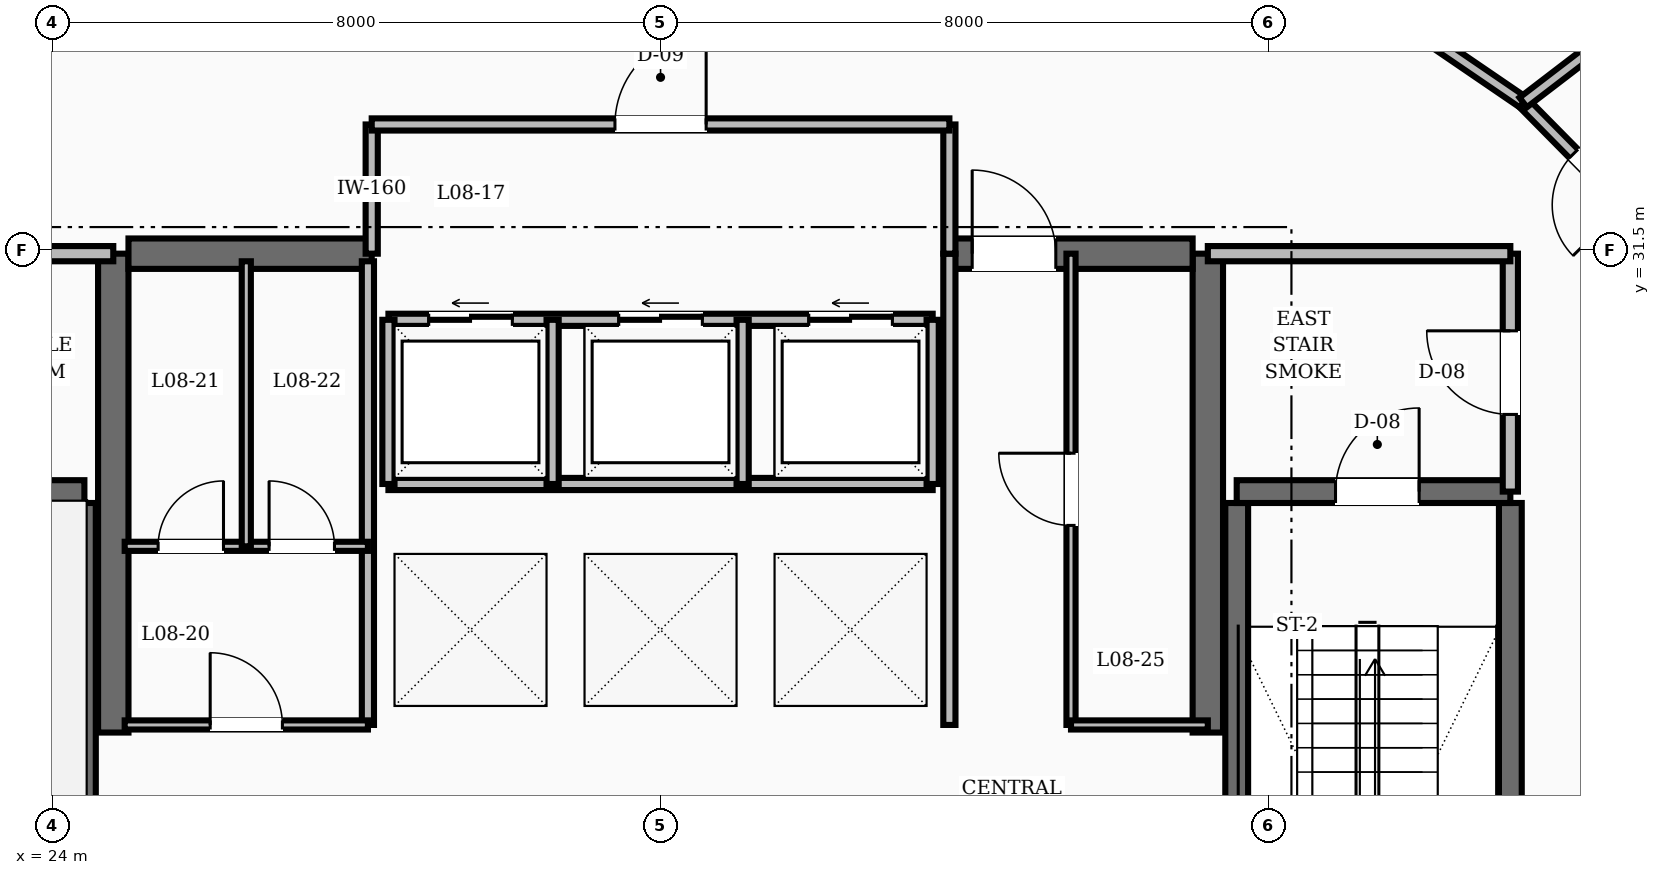
"""IFC4 building model, lengths in metres.
Left out: names, types, materials, properties, quantities, classifications, styles, units other than length and angle.
Written with IfcOpenShell. Run it as: python <this file> out.ifc"""

import sys

from ifc_helpers import new_model, si_unit, direction, frame, frame_2d, origin, place, context, subcontext, project, spatial, rectangle, extrude, element, fill, save


model = new_model("IFC4")
c1 = context("Model", 3, precision=1e-05, world=origin(), true_north=direction((0.0, 1.0)))
c2 = subcontext(c1, "Body", "Model", "MODEL_VIEW")
j1 = project(units=[si_unit("LENGTHUNIT", "METRE"), si_unit("PLANEANGLEUNIT", "RADIAN")], contexts=[c1])
p1 = place(None, origin())
s1 = spatial("IfcSite", under=j1, at=p1, CompositionType="ELEMENT")
p2 = place(p1, origin())
s2 = spatial("IfcBuilding", under=s1, at=p2, CompositionType="ELEMENT")
p3 = place(p2, frame((0.0, 0.0, 37.6)))
s3 = spatial("IfcBuildingStorey", under=s2, at=p3, CompositionType="ELEMENT", Elevation=37.6)
for number, where, z_axis, x_axis in (
    (1, (24.8, 25.15, 0.0), (0.0, 0.0, 1.0), (0.0, 1.0, 0.0)),
    (2, (39.2, 25.15, 0.0), (0.0, 0.0, 1.0), (0.0, 1.0, 0.0)),
):
    element("IfcWall", number, at=place(p3, frame(where, z_axis=z_axis, x_axis=x_axis)), inside=s3, PredefinedType="SHEAR", context=c2, shape_type="SweptSolid", body=[
        extrude(rectangle(XDim=6.3, YDim=0.4, at=frame_2d((3.15, 0.0))), origin(), (0.0, 0.0, 1.0), 3.6),
    ])
p4 = place(p3, frame((25.0, 31.45, 0.0), z_axis=(0.0, 0.0, 1.0), x_axis=(1.0, 0.0, 0.0)))
e3 = element("IfcWall", 3, at=p4, inside=s3, PredefinedType="SHEAR", context=c2, shape_type="SweptSolid", body=[
    extrude(rectangle(XDim=3.2, YDim=0.4, at=frame_2d((1.6, 0.0))), origin(), (0.0, 0.0, 1.0), 3.6),
])
p5 = place(p3, frame((35.8, 31.45, 0.0), z_axis=(0.0, 0.0, 1.0), x_axis=(1.0, 0.0, 0.0)))
e4 = element("IfcWall", 4, at=p5, inside=s3, PredefinedType="SHEAR", context=c2, shape_type="SweptSolid", body=[
    extrude(rectangle(XDim=3.2, YDim=0.4, at=frame_2d((1.6, 0.0))), origin(), (0.0, 0.0, 1.0), 3.6),
])
p6 = place(p5, frame((0.3, 0.0, 0.0)))
e5 = element("IfcOpeningElement", 5, at=p6, cuts=e4, PredefinedType="OPENING", context=c2, shape_type="SweptSolid", body=[
    extrude(rectangle(XDim=1.1, YDim=2.1, at=frame_2d((0.55, 1.05))), frame((0.0, 0.21, 0.0), z_axis=(0.0, -1.0, 0.0), x_axis=(1.0, 0.0, 0.0)), (0.0, 0.0, 1.0), 0.42),
])
p7 = place(p3, frame((24.42, 19.43, 0.0), z_axis=(0.0, 0.0, 1.0), x_axis=(0.0, 1.0, 0.0)))
e6 = element("IfcWall", 6, at=p7, inside=s3, PredefinedType="SHEAR", context=c2, shape_type="SweptSolid", body=[
    extrude(rectangle(XDim=8.74, YDim=0.3, at=frame_2d((4.37, 0.0))), origin(), (0.0, 0.0, 1.0), 3.6),
])
p8 = place(p3, frame((20.82, 28.32, 0.0), z_axis=(0.0, 0.0, 1.0), x_axis=(1.0, 0.0, 0.0)))
e7 = element("IfcWall", 7, at=p8, inside=s3, PredefinedType="SHEAR", context=c2, shape_type="SweptSolid", body=[
    extrude(rectangle(XDim=3.6, YDim=0.3, at=frame_2d((1.8, 0.0))), origin(), (0.0, 0.0, 1.0), 3.6),
])
for number, where, z_axis, x_axis in (
    (8, (43.18, 19.43, 0.0), (0.0, 0.0, 1.0), (0.0, 1.0, 0.0)),
    (9, (39.58, 19.43, 0.0), (0.0, 0.0, 1.0), (0.0, 1.0, 0.0)),
):
    element("IfcWall", number, at=place(p3, frame(where, z_axis=z_axis, x_axis=x_axis)), inside=s3, PredefinedType="SHEAR", context=c2, shape_type="SweptSolid", body=[
        extrude(rectangle(XDim=8.74, YDim=0.3, at=frame_2d((4.37, 0.0))), origin(), (0.0, 0.0, 1.0), 3.6),
    ])
p9 = place(p3, frame((39.58, 28.32, 0.0), z_axis=(0.0, 0.0, 1.0), x_axis=(1.0, 0.0, 0.0)))
e10 = element("IfcWall", 10, at=p9, inside=s3, PredefinedType="SHEAR", context=c2, shape_type="SweptSolid", body=[
    extrude(rectangle(XDim=3.6, YDim=0.3, at=frame_2d((1.8, 0.0))), origin(), (0.0, 0.0, 1.0), 3.6),
])
p10 = place(p9, frame((1.3, 0.0, 0.0)))
e11 = element("IfcOpeningElement", 11, at=p10, cuts=e10, PredefinedType="OPENING", context=c2, shape_type="SweptSolid", body=[
    extrude(rectangle(XDim=1.1, YDim=2.1, at=frame_2d((0.55, 1.05))), frame((0.0, 0.16, 0.0), z_axis=(0.0, -1.0, 0.0), x_axis=(1.0, 0.0, 0.0)), (0.0, 0.0, 1.0), 0.32),
])
p11 = place(p3, frame((43.18, 28.32, 0.0), z_axis=(0.0, 0.0, 1.0), x_axis=(0.0, 1.0, 0.0)))
e12 = element("IfcWall", 12, at=p11, inside=s3, PredefinedType="SOLIDWALL", context=c2, shape_type="SweptSolid", body=[
    extrude(rectangle(XDim=3.13, YDim=0.2, at=frame_2d((1.565, 0.0))), origin(), (0.0, 0.0, 1.0), 2.61),
])
p12 = place(p11, frame((1.015, 0.0, 0.0)))
e13 = element("IfcOpeningElement", 13, at=p12, cuts=e12, PredefinedType="OPENING", context=c2, shape_type="SweptSolid", body=[
    extrude(rectangle(XDim=1.1, YDim=2.1, at=frame_2d((0.55, 1.05))), frame((0.0, 0.11, 0.0), z_axis=(0.0, -1.0, 0.0), x_axis=(1.0, 0.0, 0.0)), (0.0, 0.0, 1.0), 0.22),
])
for number, where, z_axis, x_axis in (
    (14, (39.2, 31.45, 0.0), (0.0, 0.0, 1.0), (1.0, 0.0, 0.0)),
    (15, (20.82, 31.45, 0.0), (0.0, 0.0, 1.0), (1.0, 0.0, 0.0)),
):
    element("IfcWall", number, at=place(p3, frame(where, z_axis=z_axis, x_axis=x_axis)), inside=s3, PredefinedType="SOLIDWALL", context=c2, shape_type="SweptSolid", body=[
        extrude(rectangle(XDim=3.98, YDim=0.2, at=frame_2d((1.99, 0.0))), origin(), (0.0, 0.0, 1.0), 2.61),
    ])
p13 = place(p3, frame((35.8, 25.25, 0.0), z_axis=(0.0, 0.0, 1.0), x_axis=(0.0, 1.0, 0.0)))
e16 = element("IfcWall", 16, at=p13, inside=s3, PredefinedType="SOLIDWALL", context=c2, shape_type="SweptSolid", body=[
    extrude(rectangle(XDim=6.2, YDim=0.16, at=frame_2d((3.1, 0.0))), origin(), (0.0, 0.0, 1.0), 2.61),
])
p14 = place(p3, frame((28.42, 30.58, 0.0), z_axis=(0.0, 0.0, 1.0), x_axis=(1.0, 0.0, 0.0)))
e17 = element("IfcWall", 17, at=p14, inside=s3, PredefinedType="SOLIDWALL", context=c2, shape_type="SweptSolid", body=[
    extrude(rectangle(XDim=7.16, YDim=0.16, at=frame_2d((3.58, 0.0))), origin(), (0.0, 0.0, 1.0), 2.61),
])
p15 = place(p14, frame((0.53, 0.0, 0.0)))
e18 = element("IfcOpeningElement", 18, at=p15, cuts=e17, PredefinedType="OPENING", context=c2, shape_type="SweptSolid", body=[
    extrude(rectangle(XDim=1.1, YDim=2.15, at=frame_2d((0.55, 1.075))), frame((0.0, 0.09, 0.0), z_axis=(0.0, -1.0, 0.0), x_axis=(1.0, 0.0, 0.0)), (0.0, 0.0, 1.0), 0.18),
])
p16 = place(p14, frame((3.03, 0.0, 0.0)))
e19 = element("IfcOpeningElement", 19, at=p16, cuts=e17, PredefinedType="OPENING", context=c2, shape_type="SweptSolid", body=[
    extrude(rectangle(XDim=1.1, YDim=2.15, at=frame_2d((0.55, 1.075))), frame((0.0, 0.09, 0.0), z_axis=(0.0, -1.0, 0.0), x_axis=(1.0, 0.0, 0.0)), (0.0, 0.0, 1.0), 0.18),
])
p17 = place(p14, frame((5.53, 0.0, 0.0)))
e20 = element("IfcOpeningElement", 20, at=p17, cuts=e17, PredefinedType="OPENING", context=c2, shape_type="SweptSolid", body=[
    extrude(rectangle(XDim=1.1, YDim=2.15, at=frame_2d((0.55, 1.075))), frame((0.0, 0.09, 0.0), z_axis=(0.0, -1.0, 0.0), x_axis=(1.0, 0.0, 0.0)), (0.0, 0.0, 1.0), 0.18),
])
p18 = place(p3, frame((28.42, 28.42, 0.0), z_axis=(0.0, 0.0, 1.0), x_axis=(1.0, 0.0, 0.0)))
e21 = element("IfcWall", 21, at=p18, inside=s3, PredefinedType="SOLIDWALL", context=c2, shape_type="SweptSolid", body=[
    extrude(rectangle(XDim=7.16, YDim=0.16, at=frame_2d((3.58, 0.0))), origin(), (0.0, 0.0, 1.0), 2.61),
])
for number, where, z_axis, x_axis in (
    (22, (28.42, 28.42, 0.0), (0.0, 0.0, 1.0), (0.0, 1.0, 0.0)),
    (23, (30.58, 28.42, 0.0), (0.0, 0.0, 1.0), (0.0, 1.0, 0.0)),
    (24, (33.08, 28.42, 0.0), (0.0, 0.0, 1.0), (0.0, 1.0, 0.0)),
    (25, (35.58, 28.42, 0.0), (0.0, 0.0, 1.0), (0.0, 1.0, 0.0)),
):
    element("IfcWall", number, at=place(p3, frame(where, z_axis=z_axis, x_axis=x_axis)), inside=s3, PredefinedType="SOLIDWALL", context=c2, shape_type="SweptSolid", body=[
        extrude(rectangle(XDim=2.16, YDim=0.16, at=frame_2d((1.08, 0.0))), origin(), (0.0, 0.0, 1.0), 2.61),
    ])
for number, where, z_axis, x_axis in (
    (26, (28.2, 31.45, 0.0), (0.0, 0.0, 1.0), (0.0, 1.0, 0.0)),
    (27, (35.8, 31.45, 0.0), (0.0, 0.0, 1.0), (0.0, 1.0, 0.0)),
):
    element("IfcWall", number, at=place(p3, frame(where, z_axis=z_axis, x_axis=x_axis)), inside=s3, PredefinedType="SOLIDWALL", context=c2, shape_type="SweptSolid", body=[
        extrude(rectangle(XDim=1.7, YDim=0.16, at=frame_2d((0.85, 0.0))), origin(), (0.0, 0.0, 1.0), 2.61),
    ])
p19 = place(p3, frame((28.2, 33.15, 0.0), z_axis=(0.0, 0.0, 1.0), x_axis=(1.0, 0.0, 0.0)))
e28 = element("IfcWall", 28, at=p19, inside=s3, PredefinedType="SOLIDWALL", context=c2, shape_type="SweptSolid", body=[
    extrude(rectangle(XDim=7.6, YDim=0.16, at=frame_2d((3.8, 0.0))), origin(), (0.0, 0.0, 1.0), 2.61),
])
p20 = place(p19, frame((3.2, 0.0, 0.0)))
e29 = element("IfcOpeningElement", 29, at=p20, cuts=e28, PredefinedType="OPENING", context=c2, shape_type="SweptSolid", body=[
    extrude(rectangle(XDim=1.2, YDim=2.1, at=frame_2d((0.6, 1.05))), frame((0.0, 0.09, 0.0), z_axis=(0.0, -1.0, 0.0), x_axis=(1.0, 0.0, 0.0)), (0.0, 0.0, 1.0), 0.18),
])
p21 = place(p3, frame((28.15, 25.25, 0.0), z_axis=(0.0, 0.0, 1.0), x_axis=(0.0, 1.0, 0.0)))
e30 = element("IfcWall", 30, at=p21, inside=s3, PredefinedType="SOLIDWALL", context=c2, shape_type="SweptSolid", body=[
    extrude(rectangle(XDim=6.1, YDim=0.16, at=frame_2d((3.05, 0.0))), origin(), (0.0, 0.0, 1.0), 2.61),
])
p22 = place(p3, frame((24.95, 25.25, 0.0), z_axis=(0.0, 0.0, 1.0), x_axis=(1.0, 0.0, 0.0)))
e31 = element("IfcWall", 31, at=p22, inside=s3, PredefinedType="PARTITIONING", context=c2, shape_type="SweptSolid", body=[
    extrude(rectangle(XDim=3.2, YDim=0.12, at=frame_2d((1.6, 0.0))), origin(), (0.0, 0.0, 1.0), 2.61),
])
p23 = place(p22, frame((1.125, 0.0, 0.0)))
e32 = element("IfcOpeningElement", 32, at=p23, cuts=e31, PredefinedType="OPENING", context=c2, shape_type="SweptSolid", body=[
    extrude(rectangle(XDim=0.95, YDim=2.1, at=frame_2d((0.475, 1.05))), frame((0.0, 0.07, 0.0), z_axis=(0.0, -1.0, 0.0), x_axis=(1.0, 0.0, 0.0)), (0.0, 0.0, 1.0), 0.14),
])
p24 = place(p3, frame((37.4, 25.25, 0.0), z_axis=(0.0, 0.0, 1.0), x_axis=(0.0, 1.0, 0.0)))
e33 = element("IfcWall", 33, at=p24, inside=s3, PredefinedType="PARTITIONING", context=c2, shape_type="SweptSolid", body=[
    extrude(rectangle(XDim=6.2, YDim=0.12, at=frame_2d((3.1, 0.0))), origin(), (0.0, 0.0, 1.0), 2.61),
])
p25 = place(p24, frame((2.625, 0.0, 0.0)))
e34 = element("IfcOpeningElement", 34, at=p25, cuts=e33, PredefinedType="OPENING", context=c2, shape_type="SweptSolid", body=[
    extrude(rectangle(XDim=0.95, YDim=2.1, at=frame_2d((0.475, 1.05))), frame((0.0, 0.07, 0.0), z_axis=(0.0, -1.0, 0.0), x_axis=(1.0, 0.0, 0.0)), (0.0, 0.0, 1.0), 0.14),
])
p26 = place(p3, frame((37.4, 25.25, 0.0), z_axis=(0.0, 0.0, 1.0), x_axis=(1.0, 0.0, 0.0)))
e35 = element("IfcWall", 35, at=p26, inside=s3, PredefinedType="PARTITIONING", context=c2, shape_type="SweptSolid", body=[
    extrude(rectangle(XDim=1.8, YDim=0.12, at=frame_2d((0.9, 0.0))), origin(), (0.0, 0.0, 1.0), 2.61),
])
p27 = place(p3, frame((24.95, 27.6, 0.0), z_axis=(0.0, 0.0, 1.0), x_axis=(1.0, 0.0, 0.0)))
e36 = element("IfcWall", 36, at=p27, inside=s3, PredefinedType="PARTITIONING", context=c2, shape_type="SweptSolid", body=[
    extrude(rectangle(XDim=3.2, YDim=0.12, at=frame_2d((1.6, 0.0))), origin(), (0.0, 0.0, 1.0), 2.61),
])
p28 = place(p27, frame((0.44, 0.0, 0.0)))
e37 = element("IfcOpeningElement", 37, at=p28, cuts=e36, PredefinedType="OPENING", context=c2, shape_type="SweptSolid", body=[
    extrude(rectangle(XDim=0.86, YDim=2.1, at=frame_2d((0.43, 1.05))), frame((0.0, 0.07, 0.0), z_axis=(0.0, -1.0, 0.0), x_axis=(1.0, 0.0, 0.0)), (0.0, 0.0, 1.0), 0.14),
])
p29 = place(p27, frame((1.9, 0.0, 0.0)))
e38 = element("IfcOpeningElement", 38, at=p29, cuts=e36, PredefinedType="OPENING", context=c2, shape_type="SweptSolid", body=[
    extrude(rectangle(XDim=0.86, YDim=2.1, at=frame_2d((0.43, 1.05))), frame((0.0, 0.07, 0.0), z_axis=(0.0, -1.0, 0.0), x_axis=(1.0, 0.0, 0.0)), (0.0, 0.0, 1.0), 0.14),
])
p30 = place(p3, frame((26.55, 27.6, 0.0), z_axis=(0.0, 0.0, 1.0), x_axis=(0.0, 1.0, 0.0)))
e39 = element("IfcWall", 39, at=p30, inside=s3, PredefinedType="PARTITIONING", context=c2, shape_type="SweptSolid", body=[
    extrude(rectangle(XDim=3.75, YDim=0.12, at=frame_2d((1.875, 0.0))), origin(), (0.0, 0.0, 1.0), 2.61),
])
p31 = place(p3, frame((45.345, 31.417, 0.0), z_axis=(0.0, 0.0, 1.0), x_axis=(-0.702366174226, 0.711815816981, 0.0)))
e40 = element("IfcWall", 40, at=p31, inside=s3, PredefinedType="SOLIDWALL", context=c2, shape_type="SweptSolid", body=[
    extrude(rectangle(XDim=2.842, YDim=0.16, at=frame_2d((1.421, 0.0))), origin(), (0.0, 0.0, 1.0), 2.61),
])
p32 = place(p31, frame((0.946, 0.0, 0.0)))
e41 = element("IfcOpeningElement", 41, at=p32, cuts=e40, PredefinedType="OPENING", context=c2, shape_type="SweptSolid", body=[
    extrude(rectangle(XDim=0.95, YDim=2.1, at=frame_2d((0.475, 1.05))), frame((0.0, 0.09, 0.0), z_axis=(0.0, -1.0, 0.0), x_axis=(1.0, 0.0, 0.0)), (0.0, 0.0, 1.0), 0.18),
])
p33 = place(p3, frame((43.349, 33.44, 0.0), z_axis=(0.0, 0.0, 1.0), x_axis=(-0.825929039072, 0.563774088104, 0.0)))
e42 = element("IfcWall", 42, at=p33, inside=s3, PredefinedType="SOLIDWALL", context=c2, shape_type="SweptSolid", body=[
    extrude(rectangle(XDim=2.945, YDim=0.16, at=frame_2d((1.472, 0.0))), origin(), (0.0, 0.0, 1.0), 2.61),
])
p34 = place(p3, frame((43.349, 33.44, 0.0), z_axis=(0.0, 0.0, 1.0), x_axis=(0.793917921688, 0.608024944902, 0.0)))
e43 = element("IfcWall", 43, at=p34, inside=s3, PredefinedType="SOLIDWALL", context=c2, shape_type="SweptSolid", body=[
    extrude(rectangle(XDim=8.699, YDim=0.16, at=frame_2d((4.35, 0.0))), origin(), (0.0, 0.0, 1.0), 2.61),
])
p35 = place(p10, origin())
e44 = element("IfcDoor", 44, at=p35, inside=s3, OperationType="SINGLE_SWING_RIGHT", PredefinedType="DOOR", context=c2, shape_type="SweptSolid", body=[
    extrude(rectangle(XDim=1.1, YDim=2.1, at=frame_2d((0.55, 1.05))), frame((0.0, 0.025, 0.0), z_axis=(0.0, -1.0, 0.0), x_axis=(1.0, 0.0, 0.0)), (0.0, 0.0, 1.0), 0.05),
])
fill(e11, e44)
p36 = place(p12, origin())
e45 = element("IfcDoor", 45, at=p36, inside=s3, OperationType="SINGLE_SWING_RIGHT", PredefinedType="DOOR", context=c2, shape_type="SweptSolid", body=[
    extrude(rectangle(XDim=1.1, YDim=2.1, at=frame_2d((0.55, 1.05))), frame((0.0, 0.025, 0.0), z_axis=(0.0, -1.0, 0.0), x_axis=(1.0, 0.0, 0.0)), (0.0, 0.0, 1.0), 0.05),
])
fill(e13, e45)
p37 = place(p6, origin())
e46 = element("IfcDoor", 46, at=p37, inside=s3, OperationType="SINGLE_SWING_LEFT", PredefinedType="DOOR", context=c2, shape_type="SweptSolid", body=[
    extrude(rectangle(XDim=1.1, YDim=2.1, at=frame_2d((0.55, 1.05))), frame((0.0, 0.025, 0.0), z_axis=(0.0, -1.0, 0.0), x_axis=(1.0, 0.0, 0.0)), (0.0, 0.0, 1.0), 0.05),
])
fill(e5, e46)
p38 = place(p15, origin())
e47 = element("IfcDoor", 47, at=p38, inside=s3, OperationType="SLIDING_TO_LEFT", PredefinedType="DOOR", context=c2, shape_type="SweptSolid", body=[
    extrude(rectangle(XDim=1.1, YDim=2.15, at=frame_2d((0.55, 1.075))), frame((0.0, 0.025, 0.0), z_axis=(0.0, -1.0, 0.0), x_axis=(1.0, 0.0, 0.0)), (0.0, 0.0, 1.0), 0.05),
])
fill(e18, e47)
p39 = place(p16, origin())
e48 = element("IfcDoor", 48, at=p39, inside=s3, OperationType="SLIDING_TO_LEFT", PredefinedType="DOOR", context=c2, shape_type="SweptSolid", body=[
    extrude(rectangle(XDim=1.1, YDim=2.15, at=frame_2d((0.55, 1.075))), frame((0.0, 0.025, 0.0), z_axis=(0.0, -1.0, 0.0), x_axis=(1.0, 0.0, 0.0)), (0.0, 0.0, 1.0), 0.05),
])
fill(e19, e48)
p40 = place(p17, origin())
e49 = element("IfcDoor", 49, at=p40, inside=s3, OperationType="SLIDING_TO_LEFT", PredefinedType="DOOR", context=c2, shape_type="SweptSolid", body=[
    extrude(rectangle(XDim=1.1, YDim=2.15, at=frame_2d((0.55, 1.075))), frame((0.0, 0.025, 0.0), z_axis=(0.0, -1.0, 0.0), x_axis=(1.0, 0.0, 0.0)), (0.0, 0.0, 1.0), 0.05),
])
fill(e20, e49)
p41 = place(p20, origin())
e50 = element("IfcDoor", 50, at=p41, inside=s3, OperationType="SINGLE_SWING_RIGHT", PredefinedType="DOOR", context=c2, shape_type="SweptSolid", body=[
    extrude(rectangle(XDim=1.2, YDim=2.1, at=frame_2d((0.6, 1.05))), frame((0.0, 0.025, 0.0), z_axis=(0.0, -1.0, 0.0), x_axis=(1.0, 0.0, 0.0)), (0.0, 0.0, 1.0), 0.05),
])
fill(e29, e50)
p42 = place(p23, origin())
e51 = element("IfcDoor", 51, at=p42, inside=s3, OperationType="SINGLE_SWING_LEFT", PredefinedType="DOOR", context=c2, shape_type="SweptSolid", body=[
    extrude(rectangle(XDim=0.95, YDim=2.1, at=frame_2d((0.475, 1.05))), frame((0.0, 0.025, 0.0), z_axis=(0.0, -1.0, 0.0), x_axis=(1.0, 0.0, 0.0)), (0.0, 0.0, 1.0), 0.05),
])
fill(e32, e51)
p43 = place(p28, origin())
e52 = element("IfcDoor", 52, at=p43, inside=s3, OperationType="SINGLE_SWING_RIGHT", PredefinedType="DOOR", context=c2, shape_type="SweptSolid", body=[
    extrude(rectangle(XDim=0.86, YDim=2.1, at=frame_2d((0.43, 1.05))), frame((0.0, 0.025, 0.0), z_axis=(0.0, -1.0, 0.0), x_axis=(1.0, 0.0, 0.0)), (0.0, 0.0, 1.0), 0.05),
])
fill(e37, e52)
p44 = place(p29, origin())
e53 = element("IfcDoor", 53, at=p44, inside=s3, OperationType="SINGLE_SWING_LEFT", PredefinedType="DOOR", context=c2, shape_type="SweptSolid", body=[
    extrude(rectangle(XDim=0.86, YDim=2.1, at=frame_2d((0.43, 1.05))), frame((0.0, 0.025, 0.0), z_axis=(0.0, -1.0, 0.0), x_axis=(1.0, 0.0, 0.0)), (0.0, 0.0, 1.0), 0.05),
])
fill(e38, e53)
p45 = place(p25, origin())
e54 = element("IfcDoor", 54, at=p45, inside=s3, OperationType="SINGLE_SWING_RIGHT", PredefinedType="DOOR", context=c2, shape_type="SweptSolid", body=[
    extrude(rectangle(XDim=0.95, YDim=2.1, at=frame_2d((0.475, 1.05))), frame((0.0, 0.025, 0.0), z_axis=(0.0, -1.0, 0.0), x_axis=(1.0, 0.0, 0.0)), (0.0, 0.0, 1.0), 0.05),
])
fill(e34, e54)
p46 = place(p32, origin())
e55 = element("IfcDoor", 55, at=p46, inside=s3, OperationType="SINGLE_SWING_LEFT", PredefinedType="DOOR", context=c2, shape_type="SweptSolid", body=[
    extrude(rectangle(XDim=0.95, YDim=2.1, at=frame_2d((0.475, 1.05))), frame((0.0, 0.025, 0.0), z_axis=(0.0, -1.0, 0.0), x_axis=(1.0, 0.0, 0.0)), (0.0, 0.0, 1.0), 0.05),
])
fill(e41, e55)
save(model, sys.argv[1])
